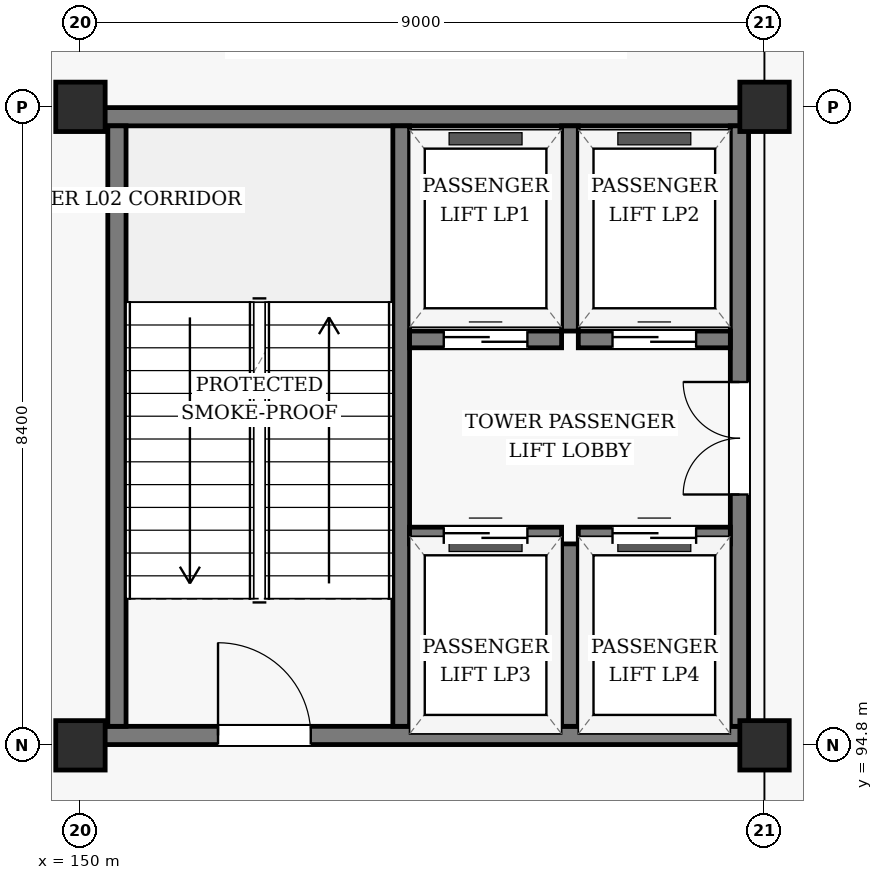
"""IFC4 building model, lengths in metres.
Left out: names, types, materials, properties, quantities, classifications, styles, units other than length and angle.
Written with IfcOpenShell. Run it as: python <this file> out.ifc"""

import sys

from ifc_helpers import new_model, si_unit, direction, frame, frame_2d, origin, origin_2d, place, context, subcontext, project, spatial, rectangle, hollow_rectangle, extrude, element, fill, save


model = new_model("IFC4")
c1 = context("Model", 3, precision=1e-05, world=origin(), true_north=direction((0.0, 1.0)))
c2 = subcontext(c1, "Body", "Model", "MODEL_VIEW")
j1 = project(units=[si_unit("LENGTHUNIT", "METRE"), si_unit("PLANEANGLEUNIT", "RADIAN")], contexts=[c1])
p1 = place(None, origin())
s1 = spatial("IfcSite", under=j1, at=p1, CompositionType="ELEMENT")
p2 = place(p1, origin())
s2 = spatial("IfcBuilding", under=s1, at=p2, CompositionType="ELEMENT")
p3 = place(p2, frame((0.0, 0.0, 9.0)))
s3 = spatial("IfcBuildingStorey", under=s2, at=p3, CompositionType="ELEMENT", Elevation=9.0)
for number, where, z_axis, x_axis in (
    (1, (150.0, 94.8, 0.0), (0.0, 0.0, 1.0), (1.0, 0.0, 0.0)),
    (2, (150.0, 103.2, 0.0), (0.0, 0.0, 1.0), (1.0, 0.0, 0.0)),
    (3, (159.0, 94.8, 0.0), (0.0, 0.0, 1.0), (1.0, 0.0, 0.0)),
    (4, (159.0, 103.2, 0.0), (0.0, 0.0, 1.0), (1.0, 0.0, 0.0)),
):
    element("IfcColumn", number, at=place(p3, frame(where, z_axis=z_axis, x_axis=x_axis)), inside=s3, PredefinedType="COLUMN", context=c2, shape_type="SweptSolid", body=[
        extrude(hollow_rectangle(XDim=0.65, YDim=0.65, WallThickness=0.028, InnerFilletRadius=0.028, OuterFilletRadius=0.056, at=origin_2d()), origin(), (0.0, 0.0, 1.0), 4.2),
    ])
p4 = place(p3, frame((150.02, 94.93, 0.0), z_axis=(0.0, 0.0, 1.0), x_axis=(1.0, 0.0, 0.0)))
e5 = element("IfcWall", 5, at=p4, inside=s3, PredefinedType="SHEAR", context=c2, shape_type="SweptSolid", body=[
    extrude(rectangle(XDim=8.77, YDim=0.24, at=frame_2d((4.385, 0.0))), origin(), (0.0, 0.0, 1.0), 3.935),
])
p5 = place(p4, frame((1.79, 0.0, 0.0)))
e6 = element("IfcOpeningElement", 6, at=p5, cuts=e5, PredefinedType="OPENING", context=c2, shape_type="SweptSolid", body=[
    extrude(rectangle(XDim=1.22, YDim=2.18, at=frame_2d((0.61, 1.09))), frame((0.0, 0.13, 0.0), z_axis=(0.0, -1.0, 0.0), x_axis=(1.0, 0.0, 0.0)), (0.0, 0.0, 1.0), 0.26),
])
p6 = place(p3, frame((150.02, 103.07, 0.0), z_axis=(0.0, 0.0, 1.0), x_axis=(1.0, 0.0, 0.0)))
e7 = element("IfcWall", 7, at=p6, inside=s3, PredefinedType="SHEAR", context=c2, shape_type="SweptSolid", body=[
    extrude(rectangle(XDim=8.77, YDim=0.24, at=frame_2d((4.385, 0.0))), origin(), (0.0, 0.0, 1.0), 3.935),
])
p7 = place(p3, frame((150.48, 95.05, 0.0), z_axis=(0.0, 0.0, 1.0), x_axis=(0.0, 1.0, 0.0)))
e8 = element("IfcWall", 8, at=p7, inside=s3, PredefinedType="SHEAR", context=c2, shape_type="SweptSolid", body=[
    extrude(rectangle(XDim=7.9, YDim=0.24, at=frame_2d((3.95, 0.0))), origin(), (0.0, 0.0, 1.0), 3.935),
])
p8 = place(p3, frame((154.22, 95.05, 0.0), z_axis=(0.0, 0.0, 1.0), x_axis=(0.0, 1.0, 0.0)))
e9 = element("IfcWall", 9, at=p8, inside=s3, PredefinedType="SHEAR", context=c2, shape_type="SweptSolid", body=[
    extrude(rectangle(XDim=7.9, YDim=0.22, at=frame_2d((3.95, 0.0))), origin(), (0.0, 0.0, 1.0), 3.935),
])
p9 = place(p3, frame((158.67, 95.05, 0.0), z_axis=(0.0, 0.0, 1.0), x_axis=(0.0, 1.0, 0.0)))
e10 = element("IfcWall", 10, at=p9, inside=s3, PredefinedType="SHEAR", context=c2, shape_type="SweptSolid", body=[
    extrude(rectangle(XDim=7.9, YDim=0.24, at=frame_2d((3.95, 0.0))), origin(), (0.0, 0.0, 1.0), 3.935),
])
p10 = place(p9, frame((3.05, 0.0, 0.0)))
e11 = element("IfcOpeningElement", 11, at=p10, cuts=e10, PredefinedType="OPENING", context=c2, shape_type="SweptSolid", body=[
    extrude(rectangle(XDim=1.48, YDim=2.22, at=frame_2d((0.74, 1.11))), frame((0.0, 0.13, 0.0), z_axis=(0.0, -1.0, 0.0), x_axis=(1.0, 0.0, 0.0)), (0.0, 0.0, 1.0), 0.26),
])
p11 = place(p3, frame((156.44, 100.25, 0.0), z_axis=(0.0, 0.0, 1.0), x_axis=(0.0, 1.0, 0.0)))
e12 = element("IfcWall", 12, at=p11, inside=s3, PredefinedType="SHEAR", context=c2, shape_type="SweptSolid", body=[
    extrude(rectangle(XDim=2.7, YDim=0.22, at=frame_2d((1.35, 0.0))), origin(), (0.0, 0.0, 1.0), 3.935),
])
p12 = place(p3, frame((154.33, 100.14, 0.0), z_axis=(0.0, 0.0, 1.0), x_axis=(1.0, 0.0, 0.0)))
e13 = element("IfcWall", 13, at=p12, inside=s3, PredefinedType="SHEAR", context=c2, shape_type="SweptSolid", body=[
    extrude(rectangle(XDim=2.0, YDim=0.22, at=frame_2d((1.0, 0.0))), origin(), (0.0, 0.0, 1.0), 3.935),
])
p13 = place(p12, frame((0.45, 0.0, 0.0)))
e14 = element("IfcOpeningElement", 14, at=p13, cuts=e13, PredefinedType="OPENING", context=c2, shape_type="SweptSolid", body=[
    extrude(rectangle(XDim=1.1, YDim=2.15, at=frame_2d((0.55, 1.075))), frame((0.0, 0.12, 0.0), z_axis=(0.0, -1.0, 0.0), x_axis=(1.0, 0.0, 0.0)), (0.0, 0.0, 1.0), 0.24),
])
p14 = place(p3, frame((156.55, 100.14, 0.0), z_axis=(0.0, 0.0, 1.0), x_axis=(1.0, 0.0, 0.0)))
e15 = element("IfcWall", 15, at=p14, inside=s3, PredefinedType="SHEAR", context=c2, shape_type="SweptSolid", body=[
    extrude(rectangle(XDim=2.0, YDim=0.22, at=frame_2d((1.0, 0.0))), origin(), (0.0, 0.0, 1.0), 3.935),
])
p15 = place(p14, frame((0.45, 0.0, 0.0)))
e16 = element("IfcOpeningElement", 16, at=p15, cuts=e15, PredefinedType="OPENING", context=c2, shape_type="SweptSolid", body=[
    extrude(rectangle(XDim=1.1, YDim=2.15, at=frame_2d((0.55, 1.075))), frame((0.0, 0.12, 0.0), z_axis=(0.0, -1.0, 0.0), x_axis=(1.0, 0.0, 0.0)), (0.0, 0.0, 1.0), 0.24),
])
p16 = place(p3, frame((156.44, 95.05, 0.0), z_axis=(0.0, 0.0, 1.0), x_axis=(0.0, 1.0, 0.0)))
e17 = element("IfcWall", 17, at=p16, inside=s3, PredefinedType="SHEAR", context=c2, shape_type="SweptSolid", body=[
    extrude(rectangle(XDim=2.4, YDim=0.22, at=frame_2d((1.2, 0.0))), origin(), (0.0, 0.0, 1.0), 3.935),
])
p17 = place(p3, frame((154.33, 97.56, 0.0), z_axis=(0.0, 0.0, 1.0), x_axis=(1.0, 0.0, 0.0)))
e18 = element("IfcWall", 18, at=p17, inside=s3, PredefinedType="SHEAR", context=c2, shape_type="SweptSolid", body=[
    extrude(rectangle(XDim=2.0, YDim=0.22, at=frame_2d((1.0, 0.0))), origin(), (0.0, 0.0, 1.0), 3.935),
])
p18 = place(p17, frame((0.45, 0.0, 0.0)))
e19 = element("IfcOpeningElement", 19, at=p18, cuts=e18, PredefinedType="OPENING", context=c2, shape_type="SweptSolid", body=[
    extrude(rectangle(XDim=1.1, YDim=2.15, at=frame_2d((0.55, 1.075))), frame((0.0, 0.12, 0.0), z_axis=(0.0, -1.0, 0.0), x_axis=(1.0, 0.0, 0.0)), (0.0, 0.0, 1.0), 0.24),
])
p19 = place(p3, frame((156.55, 97.56, 0.0), z_axis=(0.0, 0.0, 1.0), x_axis=(1.0, 0.0, 0.0)))
e20 = element("IfcWall", 20, at=p19, inside=s3, PredefinedType="SHEAR", context=c2, shape_type="SweptSolid", body=[
    extrude(rectangle(XDim=2.0, YDim=0.22, at=frame_2d((1.0, 0.0))), origin(), (0.0, 0.0, 1.0), 3.935),
])
p20 = place(p19, frame((0.45, 0.0, 0.0)))
e21 = element("IfcOpeningElement", 21, at=p20, cuts=e20, PredefinedType="OPENING", context=c2, shape_type="SweptSolid", body=[
    extrude(rectangle(XDim=1.1, YDim=2.15, at=frame_2d((0.55, 1.075))), frame((0.0, 0.12, 0.0), z_axis=(0.0, -1.0, 0.0), x_axis=(1.0, 0.0, 0.0)), (0.0, 0.0, 1.0), 0.24),
])
p21 = place(p5, origin())
e22 = element("IfcDoor", 22, at=p21, inside=s3, OperationType="SINGLE_SWING_LEFT", PredefinedType="DOOR", context=c2, shape_type="SweptSolid", body=[
    extrude(rectangle(XDim=1.22, YDim=2.18, at=frame_2d((0.61, 1.09))), frame((0.0, 0.025, 0.0), z_axis=(0.0, -1.0, 0.0), x_axis=(1.0, 0.0, 0.0)), (0.0, 0.0, 1.0), 0.05),
])
fill(e6, e22)
p22 = place(p10, origin())
e23 = element("IfcDoor", 23, at=p22, inside=s3, OperationType="DOUBLE_DOOR_SINGLE_SWING", PredefinedType="DOOR", context=c2, shape_type="SweptSolid", body=[
    extrude(rectangle(XDim=1.48, YDim=2.22, at=frame_2d((0.74, 1.11))), frame((0.0, 0.025, 0.0), z_axis=(0.0, -1.0, 0.0), x_axis=(1.0, 0.0, 0.0)), (0.0, 0.0, 1.0), 0.05),
])
fill(e11, e23)
p23 = place(p13, origin())
e24 = element("IfcDoor", 24, at=p23, inside=s3, OperationType="SLIDING_TO_LEFT", PredefinedType="DOOR", context=c2, shape_type="SweptSolid", body=[
    extrude(rectangle(XDim=1.1, YDim=2.15, at=frame_2d((0.55, 1.075))), frame((0.0, 0.025, 0.0), z_axis=(0.0, -1.0, 0.0), x_axis=(1.0, 0.0, 0.0)), (0.0, 0.0, 1.0), 0.05),
])
fill(e14, e24)
p24 = place(p15, origin())
e25 = element("IfcDoor", 25, at=p24, inside=s3, OperationType="SLIDING_TO_LEFT", PredefinedType="DOOR", context=c2, shape_type="SweptSolid", body=[
    extrude(rectangle(XDim=1.1, YDim=2.15, at=frame_2d((0.55, 1.075))), frame((0.0, 0.025, 0.0), z_axis=(0.0, -1.0, 0.0), x_axis=(1.0, 0.0, 0.0)), (0.0, 0.0, 1.0), 0.05),
])
fill(e16, e25)
p25 = place(p18, origin())
e26 = element("IfcDoor", 26, at=p25, inside=s3, OperationType="SLIDING_TO_LEFT", PredefinedType="DOOR", context=c2, shape_type="SweptSolid", body=[
    extrude(rectangle(XDim=1.1, YDim=2.15, at=frame_2d((0.55, 1.075))), frame((0.0, 0.025, 0.0), z_axis=(0.0, -1.0, 0.0), x_axis=(1.0, 0.0, 0.0)), (0.0, 0.0, 1.0), 0.05),
])
fill(e19, e26)
p26 = place(p20, origin())
e27 = element("IfcDoor", 27, at=p26, inside=s3, OperationType="SLIDING_TO_LEFT", PredefinedType="DOOR", context=c2, shape_type="SweptSolid", body=[
    extrude(rectangle(XDim=1.1, YDim=2.15, at=frame_2d((0.55, 1.075))), frame((0.0, 0.025, 0.0), z_axis=(0.0, -1.0, 0.0), x_axis=(1.0, 0.0, 0.0)), (0.0, 0.0, 1.0), 0.05),
])
fill(e21, e27)
save(model, sys.argv[1])
